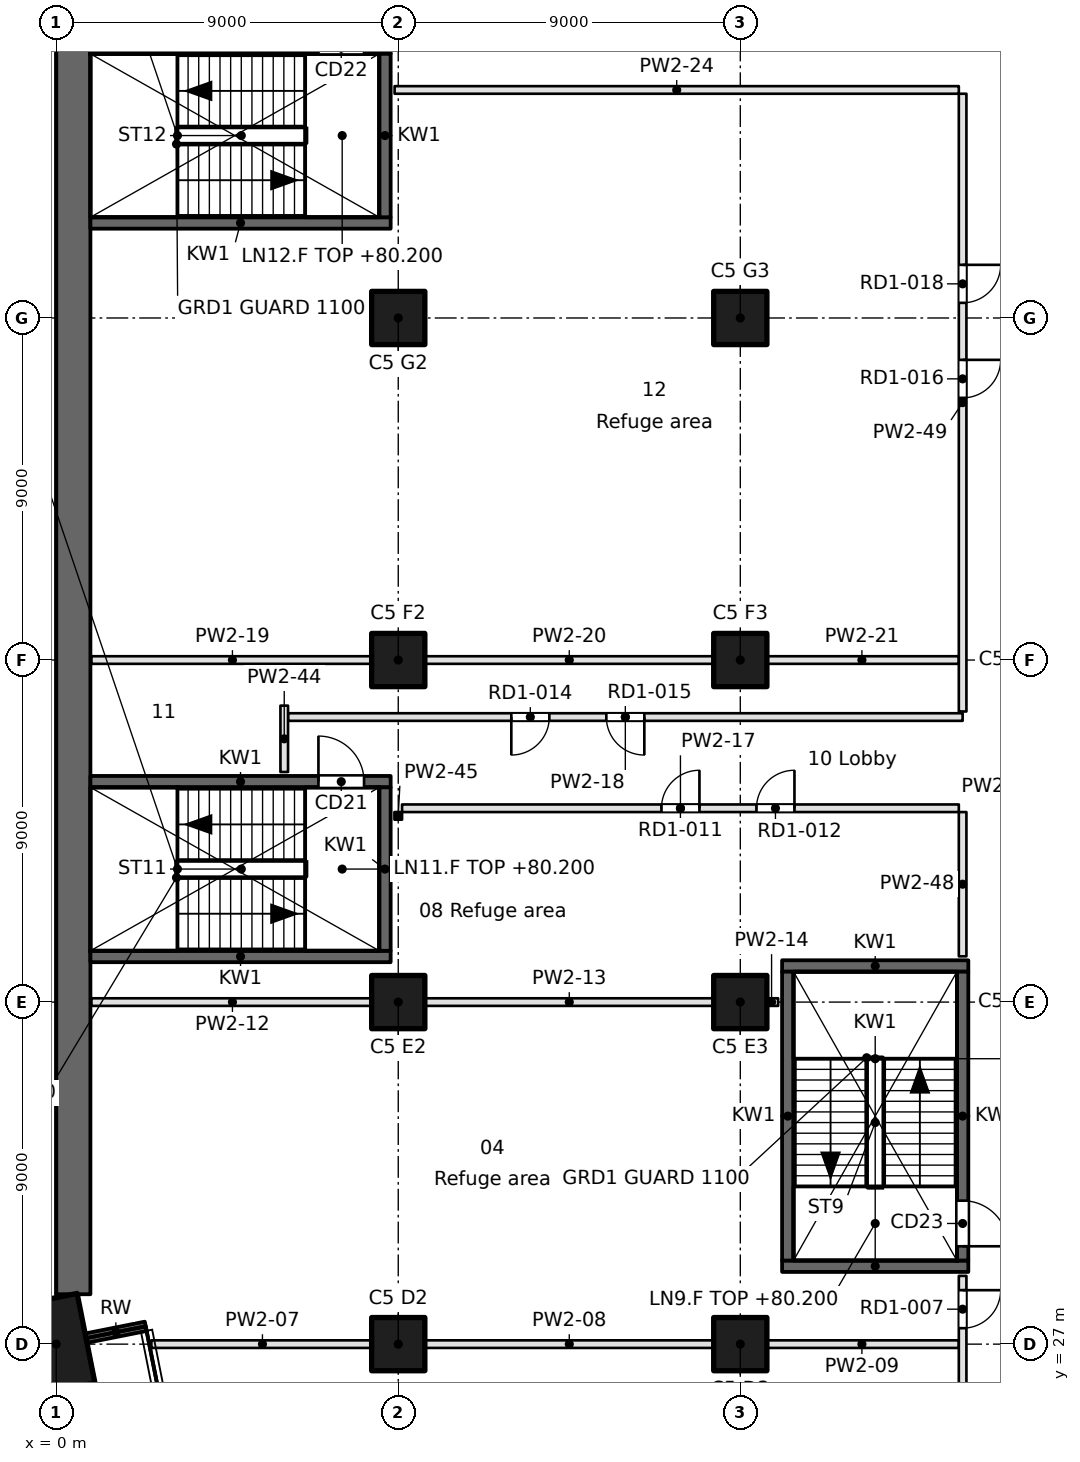
"""IFC4 building model, lengths in metres.
Left out: names, types, materials, properties, quantities, classifications, styles, units other than length and angle.
Written with IfcOpenShell. Run it as: python <this file> out.ifc"""

import sys

from ifc_helpers import new_model, si_unit, direction, frame, frame_2d, origin, origin_2d, place, context, subcontext, project, spatial, rectangle, extrude, element, fill, save


model = new_model("IFC4")
c1 = context("Model", 3, precision=1e-05, world=origin(), true_north=direction((0.0, 1.0)))
c2 = subcontext(c1, "Body", "Model", "MODEL_VIEW")
j1 = project(units=[si_unit("LENGTHUNIT", "METRE"), si_unit("PLANEANGLEUNIT", "RADIAN")], contexts=[c1])
p1 = place(None, origin())
s1 = spatial("IfcSite", under=j1, at=p1, CompositionType="ELEMENT")
p2 = place(p1, origin())
s2 = spatial("IfcBuilding", under=s1, at=p2, CompositionType="ELEMENT")
p3 = place(p2, frame((0.0, 0.0, 80.2)))
s3 = spatial("IfcBuildingStorey", under=s2, at=p3, CompositionType="ELEMENT", Elevation=80.2)
p4 = place(p3, frame((0.0, 27.0, 0.0), z_axis=(0.0, 0.0, 1.0), x_axis=(-0.195090322016, 0.980785280403, 0.0)))
e1 = element("IfcColumn", 1, at=p4, inside=s3, PredefinedType="COLUMN", context=c2, shape_type="SweptSolid", body=[
    extrude(rectangle(XDim=2.4, YDim=1.6, at=origin_2d()), origin(), (0.0, 0.0, 1.0), 4.6),
])
for number, where, z_axis, x_axis in (
    (2, (9.0, 27.0, 0.0), (0.0, 0.0, 1.0), (1.0, 0.0, 0.0)),
    (3, (9.0, 36.0, 0.0), (0.0, 0.0, 1.0), (1.0, 0.0, 0.0)),
    (4, (9.0, 45.0, 0.0), (0.0, 0.0, 1.0), (1.0, 0.0, 0.0)),
    (5, (9.0, 54.0, 0.0), (0.0, 0.0, 1.0), (1.0, 0.0, 0.0)),
    (6, (18.0, 27.0, 0.0), (0.0, 0.0, 1.0), (1.0, 0.0, 0.0)),
    (7, (18.0, 36.0, 0.0), (0.0, 0.0, 1.0), (1.0, 0.0, 0.0)),
    (8, (18.0, 45.0, 0.0), (0.0, 0.0, 1.0), (1.0, 0.0, 0.0)),
    (9, (18.0, 54.0, 0.0), (0.0, 0.0, 1.0), (1.0, 0.0, 0.0)),
):
    element("IfcColumn", number, at=place(p3, frame(where, z_axis=z_axis, x_axis=x_axis)), inside=s3, PredefinedType="COLUMN", context=c2, shape_type="SweptSolid", body=[
        extrude(rectangle(XDim=1.4, YDim=1.4, at=origin_2d()), origin(), (0.0, 0.0, 1.0), 4.6),
    ])
p5 = place(p3, frame((0.45, 94.5, 0.0), z_axis=(0.0, 0.0, 1.0), x_axis=(0.0, -1.0, 0.0)))
e10 = element("IfcWall", 10, at=p5, inside=s3, PredefinedType="SHEAR", context=c2, shape_type="SweptSolid", body=[
    extrude(rectangle(XDim=66.187, YDim=0.9, at=frame_2d((33.094, 0.0))), origin(), (0.0, 0.0, 1.0), 4.6),
])
p6 = place(p3, frame((0.784, 27.157, 0.0), z_axis=(0.0, 0.0, 1.0), x_axis=(0.980826234823, 0.19488431718, 0.0)))
e11 = element("IfcWall", 11, at=p6, inside=s3, PredefinedType="SOLIDWALL", context=c2, shape_type="SweptSolid", body=[
    extrude(rectangle(XDim=1.601, YDim=0.25, at=frame_2d((0.801, 0.0))), origin(), (0.0, 0.0, 1.0), 4.2),
])
for number, where, z_axis, x_axis in (
    (12, (19.1, 29.05, -0.45), (0.0, 0.0, 1.0), (1.0, 0.0, 0.0)),
    (13, (19.1, 36.95, -0.45), (0.0, 0.0, 1.0), (1.0, 0.0, 0.0)),
):
    element("IfcWall", number, at=place(p3, frame(where, z_axis=z_axis, x_axis=x_axis)), inside=s3, PredefinedType="SOLIDWALL", context=c2, shape_type="SweptSolid", body=[
        extrude(rectangle(XDim=4.9, YDim=0.3, at=frame_2d((2.45, 0.0))), origin(), (0.0, 0.0, 1.0), 4.65),
    ])
p7 = place(p3, frame((0.9, 37.2, -0.45), z_axis=(0.0, 0.0, 1.0), x_axis=(1.0, 0.0, 0.0)))
e14 = element("IfcWall", 14, at=p7, inside=s3, PredefinedType="SOLIDWALL", context=c2, shape_type="SweptSolid", body=[
    extrude(rectangle(XDim=7.9, YDim=0.3, at=frame_2d((3.95, 0.0))), origin(), (0.0, 0.0, 1.0), 4.65),
])
p8 = place(p3, frame((0.9, 41.8, -0.45), z_axis=(0.0, 0.0, 1.0), x_axis=(1.0, 0.0, 0.0)))
e15 = element("IfcWall", 15, at=p8, inside=s3, PredefinedType="SOLIDWALL", context=c2, shape_type="SweptSolid", body=[
    extrude(rectangle(XDim=7.9, YDim=0.3, at=frame_2d((3.95, 0.0))), origin(), (0.0, 0.0, 1.0), 4.65),
])
p9 = place(p8, frame((6.0, 0.0, 0.45)))
e16 = element("IfcOpeningElement", 16, at=p9, cuts=e15, PredefinedType="OPENING", context=c2, shape_type="SweptSolid", body=[
    extrude(rectangle(XDim=1.2, YDim=2.1, at=frame_2d((0.6, 1.05))), frame((0.0, 0.15, 0.0), z_axis=(0.0, -1.0, 0.0), x_axis=(1.0, 0.0, 0.0)), (0.0, 0.0, 1.0), 0.3),
])
p10 = place(p3, frame((0.9, 56.5, -0.45), z_axis=(0.0, 0.0, 1.0), x_axis=(1.0, 0.0, 0.0)))
e17 = element("IfcWall", 17, at=p10, inside=s3, PredefinedType="SOLIDWALL", context=c2, shape_type="SweptSolid", body=[
    extrude(rectangle(XDim=7.9, YDim=0.3, at=frame_2d((3.95, 0.0))), origin(), (0.0, 0.0, 1.0), 4.65),
])
p11 = place(p3, frame((0.9, 61.1, -0.45), z_axis=(0.0, 0.0, 1.0), x_axis=(1.0, 0.0, 0.0)))
e18 = element("IfcWall", 18, at=p11, inside=s3, PredefinedType="SOLIDWALL", context=c2, shape_type="SweptSolid", body=[
    extrude(rectangle(XDim=7.9, YDim=0.3, at=frame_2d((3.95, 0.0))), origin(), (0.0, 0.0, 1.0), 4.65),
])
p12 = place(p11, frame((6.0, 0.0, 0.45)))
e19 = element("IfcOpeningElement", 19, at=p12, cuts=e18, PredefinedType="OPENING", context=c2, shape_type="SweptSolid", body=[
    extrude(rectangle(XDim=1.2, YDim=2.1, at=frame_2d((0.6, 1.05))), frame((0.0, 0.15, 0.0), z_axis=(0.0, -1.0, 0.0), x_axis=(1.0, 0.0, 0.0)), (0.0, 0.0, 1.0), 0.3),
])
p13 = place(p3, frame((8.65, 37.35, -0.45), z_axis=(0.0, 0.0, 1.0), x_axis=(0.0, 1.0, 0.0)))
e20 = element("IfcWall", 20, at=p13, inside=s3, PredefinedType="SOLIDWALL", context=c2, shape_type="SweptSolid", body=[
    extrude(rectangle(XDim=4.3, YDim=0.3, at=frame_2d((2.15, 0.0))), origin(), (0.0, 0.0, 1.0), 4.65),
])
p14 = place(p3, frame((8.65, 56.65, -0.45), z_axis=(0.0, 0.0, 1.0), x_axis=(0.0, 1.0, 0.0)))
e21 = element("IfcWall", 21, at=p14, inside=s3, PredefinedType="SOLIDWALL", context=c2, shape_type="SweptSolid", body=[
    extrude(rectangle(XDim=4.3, YDim=0.3, at=frame_2d((2.15, 0.0))), origin(), (0.0, 0.0, 1.0), 4.65),
])
p15 = place(p3, frame((19.25, 29.2, -0.45), z_axis=(0.0, 0.0, 1.0), x_axis=(0.0, 1.0, 0.0)))
e22 = element("IfcWall", 22, at=p15, inside=s3, PredefinedType="SOLIDWALL", context=c2, shape_type="SweptSolid", body=[
    extrude(rectangle(XDim=7.6, YDim=0.3, at=frame_2d((3.8, 0.0))), origin(), (0.0, 0.0, 1.0), 4.65),
])
p16 = place(p3, frame((23.85, 29.2, -0.45), z_axis=(0.0, 0.0, 1.0), x_axis=(0.0, 1.0, 0.0)))
e23 = element("IfcWall", 23, at=p16, inside=s3, PredefinedType="SOLIDWALL", context=c2, shape_type="SweptSolid", body=[
    extrude(rectangle(XDim=7.6, YDim=0.3, at=frame_2d((3.8, 0.0))), origin(), (0.0, 0.0, 1.0), 4.65),
])
p17 = place(p16, frame((0.375, 0.0, 0.45)))
e24 = element("IfcOpeningElement", 24, at=p17, cuts=e23, PredefinedType="OPENING", context=c2, shape_type="SweptSolid", body=[
    extrude(rectangle(XDim=1.2, YDim=2.1, at=frame_2d((0.6, 1.05))), frame((0.0, 0.15, 0.0), z_axis=(0.0, -1.0, 0.0), x_axis=(1.0, 0.0, 0.0)), (0.0, 0.0, 1.0), 0.3),
])
p18 = place(p3, frame((2.503, 27.0, 0.0), z_axis=(0.0, 0.0, 1.0), x_axis=(1.0, 0.0, 0.0)))
e25 = element("IfcWall", 25, at=p18, inside=s3, PredefinedType="PARTITIONING", context=c2, shape_type="SweptSolid", body=[
    extrude(rectangle(XDim=5.847, YDim=0.2, at=frame_2d((2.924, 0.0))), origin(), (0.0, 0.0, 1.0), 4.2),
])
p19 = place(p3, frame((9.65, 27.0, 0.0), z_axis=(0.0, 0.0, 1.0), x_axis=(1.0, 0.0, 0.0)))
e26 = element("IfcWall", 26, at=p19, inside=s3, PredefinedType="PARTITIONING", context=c2, shape_type="SweptSolid", body=[
    extrude(rectangle(XDim=7.7, YDim=0.2, at=frame_2d((3.85, 0.0))), origin(), (0.0, 0.0, 1.0), 4.2),
])
p20 = place(p3, frame((18.65, 27.0, 0.0), z_axis=(0.0, 0.0, 1.0), x_axis=(1.0, 0.0, 0.0)))
e27 = element("IfcWall", 27, at=p20, inside=s3, PredefinedType="PARTITIONING", context=c2, shape_type="SweptSolid", body=[
    extrude(rectangle(XDim=5.1, YDim=0.2, at=frame_2d((2.55, 0.0))), origin(), (0.0, 0.0, 1.0), 4.2),
])
p21 = place(p3, frame((0.924, 36.0, 0.0), z_axis=(0.0, 0.0, 1.0), x_axis=(1.0, 0.0, 0.0)))
e28 = element("IfcWall", 28, at=p21, inside=s3, PredefinedType="PARTITIONING", context=c2, shape_type="SweptSolid", body=[
    extrude(rectangle(XDim=7.426, YDim=0.2, at=frame_2d((3.713, 0.0))), origin(), (0.0, 0.0, 1.0), 4.2),
])
p22 = place(p3, frame((9.65, 36.0, 0.0), z_axis=(0.0, 0.0, 1.0), x_axis=(1.0, 0.0, 0.0)))
e29 = element("IfcWall", 29, at=p22, inside=s3, PredefinedType="PARTITIONING", context=c2, shape_type="SweptSolid", body=[
    extrude(rectangle(XDim=7.7, YDim=0.2, at=frame_2d((3.85, 0.0))), origin(), (0.0, 0.0, 1.0), 4.2),
])
p23 = place(p3, frame((18.65, 36.0, 0.0), z_axis=(0.0, 0.0, 1.0), x_axis=(1.0, 0.0, 0.0)))
e30 = element("IfcWall", 30, at=p23, inside=s3, PredefinedType="PARTITIONING", context=c2, shape_type="SweptSolid", body=[
    extrude(rectangle(XDim=0.346, YDim=0.2, at=frame_2d((0.173, 0.0))), origin(), (0.0, 0.0, 1.0), 4.2),
])
p24 = place(p3, frame((23.75, 41.1, 0.0), z_axis=(0.0, 0.0, 1.0), x_axis=(-1.0, 0.0, 0.0)))
e31 = element("IfcWall", 31, at=p24, inside=s3, PredefinedType="PARTITIONING", context=c2, shape_type="SweptSolid", body=[
    extrude(rectangle(XDim=14.65, YDim=0.2, at=frame_2d((7.325, 0.0))), origin(), (0.0, 0.0, 1.0), 4.2),
])
p25 = place(p24, frame((6.825, 0.0, 0.0)))
e32 = element("IfcOpeningElement", 32, at=p25, cuts=e31, PredefinedType="OPENING", context=c2, shape_type="SweptSolid", body=[
    extrude(rectangle(XDim=1.0, YDim=2.1, at=frame_2d((0.5, 1.05))), frame((0.0, 0.1, 0.0), z_axis=(0.0, -1.0, 0.0), x_axis=(1.0, 0.0, 0.0)), (0.0, 0.0, 1.0), 0.2),
])
p26 = place(p24, frame((4.325, 0.0, 0.0)))
e33 = element("IfcOpeningElement", 33, at=p26, cuts=e31, PredefinedType="OPENING", context=c2, shape_type="SweptSolid", body=[
    extrude(rectangle(XDim=1.0, YDim=2.1, at=frame_2d((0.5, 1.05))), frame((0.0, 0.1, 0.0), z_axis=(0.0, -1.0, 0.0), x_axis=(1.0, 0.0, 0.0)), (0.0, 0.0, 1.0), 0.2),
])
p27 = place(p3, frame((6.1, 43.5, 0.0), z_axis=(0.0, 0.0, 1.0), x_axis=(1.0, 0.0, 0.0)))
e34 = element("IfcWall", 34, at=p27, inside=s3, PredefinedType="PARTITIONING", context=c2, shape_type="SweptSolid", body=[
    extrude(rectangle(XDim=17.75, YDim=0.2, at=frame_2d((8.875, 0.0))), origin(), (0.0, 0.0, 1.0), 4.2),
])
p28 = place(p27, frame((5.875, 0.0, 0.0)))
e35 = element("IfcOpeningElement", 35, at=p28, cuts=e34, PredefinedType="OPENING", context=c2, shape_type="SweptSolid", body=[
    extrude(rectangle(XDim=1.0, YDim=2.1, at=frame_2d((0.5, 1.05))), frame((0.0, 0.1, 0.0), z_axis=(0.0, -1.0, 0.0), x_axis=(1.0, 0.0, 0.0)), (0.0, 0.0, 1.0), 0.2),
])
p29 = place(p27, frame((8.375, 0.0, 0.0)))
e36 = element("IfcOpeningElement", 36, at=p29, cuts=e34, PredefinedType="OPENING", context=c2, shape_type="SweptSolid", body=[
    extrude(rectangle(XDim=1.0, YDim=2.1, at=frame_2d((0.5, 1.05))), frame((0.0, 0.1, 0.0), z_axis=(0.0, -1.0, 0.0), x_axis=(1.0, 0.0, 0.0)), (0.0, 0.0, 1.0), 0.2),
])
p30 = place(p3, frame((0.924, 45.0, 0.0), z_axis=(0.0, 0.0, 1.0), x_axis=(1.0, 0.0, 0.0)))
e37 = element("IfcWall", 37, at=p30, inside=s3, PredefinedType="PARTITIONING", context=c2, shape_type="SweptSolid", body=[
    extrude(rectangle(XDim=7.426, YDim=0.2, at=frame_2d((3.713, 0.0))), origin(), (0.0, 0.0, 1.0), 4.2),
])
p31 = place(p3, frame((9.65, 45.0, 0.0), z_axis=(0.0, 0.0, 1.0), x_axis=(1.0, 0.0, 0.0)))
e38 = element("IfcWall", 38, at=p31, inside=s3, PredefinedType="PARTITIONING", context=c2, shape_type="SweptSolid", body=[
    extrude(rectangle(XDim=7.7, YDim=0.2, at=frame_2d((3.85, 0.0))), origin(), (0.0, 0.0, 1.0), 4.2),
])
p32 = place(p3, frame((18.65, 45.0, 0.0), z_axis=(0.0, 0.0, 1.0), x_axis=(1.0, 0.0, 0.0)))
e39 = element("IfcWall", 39, at=p32, inside=s3, PredefinedType="PARTITIONING", context=c2, shape_type="SweptSolid", body=[
    extrude(rectangle(XDim=5.1, YDim=0.2, at=frame_2d((2.55, 0.0))), origin(), (0.0, 0.0, 1.0), 4.2),
])
p33 = place(p3, frame((23.75, 60.0, 0.0), z_axis=(0.0, 0.0, 1.0), x_axis=(-1.0, 0.0, 0.0)))
e40 = element("IfcWall", 40, at=p33, inside=s3, PredefinedType="PARTITIONING", context=c2, shape_type="SweptSolid", body=[
    extrude(rectangle(XDim=14.846, YDim=0.2, at=frame_2d((7.423, 0.0))), origin(), (0.0, 0.0, 1.0), 4.2),
])
p34 = place(p3, frame((6.0, 42.054, 0.0), z_axis=(0.0, 0.0, 1.0), x_axis=(0.0, 1.0, 0.0)))
e41 = element("IfcWall", 41, at=p34, inside=s3, PredefinedType="PARTITIONING", context=c2, shape_type="SweptSolid", body=[
    extrude(rectangle(XDim=1.746, YDim=0.2, at=frame_2d((0.873, 0.0))), origin(), (0.0, 0.0, 1.0), 4.2),
])
p35 = place(p3, frame((9.0, 41.0, 0.0), z_axis=(0.0, 0.0, 1.0), x_axis=(0.0, -1.0, 0.0)))
e42 = element("IfcWall", 42, at=p35, inside=s3, PredefinedType="PARTITIONING", context=c2, shape_type="SweptSolid", body=[
    extrude(rectangle(XDim=0.2, YDim=0.2, at=frame_2d((0.1, 0.0))), origin(), (0.0, 0.0, 1.0), 4.2),
])
p36 = place(p3, frame((23.85, 7.272, 0.0), z_axis=(0.0, 0.0, 1.0), x_axis=(0.0, 1.0, 0.0)))
e43 = element("IfcWall", 43, at=p36, inside=s3, PredefinedType="PARTITIONING", context=c2, shape_type="SweptSolid", body=[
    extrude(rectangle(XDim=21.524, YDim=0.2, at=frame_2d((10.762, 0.0))), origin(), (0.0, 0.0, 1.0), 4.2),
])
p37 = place(p36, frame((3.88, 0.0, 0.0)))
e44 = element("IfcOpeningElement", 44, at=p37, cuts=e43, PredefinedType="OPENING", context=c2, shape_type="SweptSolid", body=[
    extrude(rectangle(XDim=1.0, YDim=2.1, at=frame_2d((0.5, 1.05))), frame((0.0, 0.1, 0.0), z_axis=(0.0, -1.0, 0.0), x_axis=(1.0, 0.0, 0.0)), (0.0, 0.0, 1.0), 0.2),
])
p38 = place(p36, frame((6.38, 0.0, 0.0)))
e45 = element("IfcOpeningElement", 45, at=p38, cuts=e43, PredefinedType="OPENING", context=c2, shape_type="SweptSolid", body=[
    extrude(rectangle(XDim=1.0, YDim=2.1, at=frame_2d((0.5, 1.05))), frame((0.0, 0.1, 0.0), z_axis=(0.0, -1.0, 0.0), x_axis=(1.0, 0.0, 0.0)), (0.0, 0.0, 1.0), 0.2),
])
p39 = place(p36, frame((13.766, 0.0, 0.0)))
e46 = element("IfcOpeningElement", 46, at=p39, cuts=e43, PredefinedType="OPENING", context=c2, shape_type="SweptSolid", body=[
    extrude(rectangle(XDim=1.0, YDim=2.1, at=frame_2d((0.5, 1.05))), frame((0.0, 0.1, 0.0), z_axis=(0.0, -1.0, 0.0), x_axis=(1.0, 0.0, 0.0)), (0.0, 0.0, 1.0), 0.2),
])
p40 = place(p36, frame((16.266, 0.0, 0.0)))
e47 = element("IfcOpeningElement", 47, at=p40, cuts=e43, PredefinedType="OPENING", context=c2, shape_type="SweptSolid", body=[
    extrude(rectangle(XDim=1.0, YDim=2.1, at=frame_2d((0.5, 1.05))), frame((0.0, 0.1, 0.0), z_axis=(0.0, -1.0, 0.0), x_axis=(1.0, 0.0, 0.0)), (0.0, 0.0, 1.0), 0.2),
])
p41 = place(p36, frame((20.148, 0.0, 0.0)))
e48 = element("IfcOpeningElement", 48, at=p41, cuts=e43, PredefinedType="OPENING", context=c2, shape_type="SweptSolid", body=[
    extrude(rectangle(XDim=1.0, YDim=2.1, at=frame_2d((0.5, 1.05))), frame((0.0, 0.1, 0.0), z_axis=(0.0, -1.0, 0.0), x_axis=(1.0, 0.0, 0.0)), (0.0, 0.0, 1.0), 0.2),
])
p42 = place(p3, frame((23.85, 37.204, 0.0), z_axis=(0.0, 0.0, 1.0), x_axis=(0.0, 1.0, 0.0)))
e49 = element("IfcWall", 49, at=p42, inside=s3, PredefinedType="PARTITIONING", context=c2, shape_type="SweptSolid", body=[
    extrude(rectangle(XDim=3.796, YDim=0.2, at=frame_2d((1.898, 0.0))), origin(), (0.0, 0.0, 1.0), 4.2),
])
p43 = place(p3, frame((23.85, 43.646, 0.0), z_axis=(0.0, 0.0, 1.0), x_axis=(0.0, 1.0, 0.0)))
e50 = element("IfcWall", 50, at=p43, inside=s3, PredefinedType="PARTITIONING", context=c2, shape_type="SweptSolid", body=[
    extrude(rectangle(XDim=16.254, YDim=0.2, at=frame_2d((8.127, 0.0))), origin(), (0.0, 0.0, 1.0), 4.2),
])
p44 = place(p43, frame((8.252, 0.0, 0.0)))
e51 = element("IfcOpeningElement", 51, at=p44, cuts=e50, PredefinedType="OPENING", context=c2, shape_type="SweptSolid", body=[
    extrude(rectangle(XDim=1.0, YDim=2.1, at=frame_2d((0.5, 1.05))), frame((0.0, 0.1, 0.0), z_axis=(0.0, -1.0, 0.0), x_axis=(1.0, 0.0, 0.0)), (0.0, 0.0, 1.0), 0.2),
])
p45 = place(p43, frame((10.752, 0.0, 0.0)))
e52 = element("IfcOpeningElement", 52, at=p45, cuts=e50, PredefinedType="OPENING", context=c2, shape_type="SweptSolid", body=[
    extrude(rectangle(XDim=1.0, YDim=2.1, at=frame_2d((0.5, 1.05))), frame((0.0, 0.1, 0.0), z_axis=(0.0, -1.0, 0.0), x_axis=(1.0, 0.0, 0.0)), (0.0, 0.0, 1.0), 0.2),
])
p46 = place(p9, origin())
e53 = element("IfcDoor", 53, at=p46, inside=s3, OperationType="SINGLE_SWING_LEFT", PredefinedType="DOOR", context=c2, shape_type="SweptSolid", body=[
    extrude(rectangle(XDim=1.2, YDim=2.1, at=frame_2d((0.6, 1.05))), frame((0.0, 0.025, 0.0), z_axis=(0.0, -1.0, 0.0), x_axis=(1.0, 0.0, 0.0)), (0.0, 0.0, 1.0), 0.05),
])
fill(e16, e53)
p47 = place(p17, frame((1.2, 0.0, 0.0), z_axis=(0.0, 0.0, 1.0), x_axis=(-1.0, 0.0, 0.0)))
e54 = element("IfcDoor", 54, at=p47, inside=s3, OperationType="SINGLE_SWING_RIGHT", PredefinedType="DOOR", context=c2, shape_type="SweptSolid", body=[
    extrude(rectangle(XDim=1.2, YDim=2.1, at=frame_2d((0.6, 1.05))), frame((0.0, 0.025, 0.0), z_axis=(0.0, -1.0, 0.0), x_axis=(1.0, 0.0, 0.0)), (0.0, 0.0, 1.0), 0.05),
])
fill(e24, e54)
p48 = place(p41, frame((1.0, 0.0, 0.0), z_axis=(0.0, 0.0, 1.0), x_axis=(-1.0, 0.0, 0.0)))
e55 = element("IfcDoor", 55, at=p48, inside=s3, OperationType="SINGLE_SWING_LEFT", PredefinedType="DOOR", context=c2, shape_type="SweptSolid", body=[
    extrude(rectangle(XDim=1.0, YDim=2.1, at=frame_2d((0.5, 1.05))), frame((0.0, 0.025, 0.0), z_axis=(0.0, -1.0, 0.0), x_axis=(1.0, 0.0, 0.0)), (0.0, 0.0, 1.0), 0.05),
])
fill(e48, e55)
p49 = place(p25, frame((1.0, 0.0, 0.0), z_axis=(0.0, 0.0, 1.0), x_axis=(-1.0, 0.0, 0.0)))
e56 = element("IfcDoor", 56, at=p49, inside=s3, OperationType="SINGLE_SWING_RIGHT", PredefinedType="DOOR", context=c2, shape_type="SweptSolid", body=[
    extrude(rectangle(XDim=1.0, YDim=2.1, at=frame_2d((0.5, 1.05))), frame((0.0, 0.025, 0.0), z_axis=(0.0, -1.0, 0.0), x_axis=(1.0, 0.0, 0.0)), (0.0, 0.0, 1.0), 0.05),
])
fill(e32, e56)
p50 = place(p26, frame((1.0, 0.0, 0.0), z_axis=(0.0, 0.0, 1.0), x_axis=(-1.0, 0.0, 0.0)))
e57 = element("IfcDoor", 57, at=p50, inside=s3, OperationType="SINGLE_SWING_RIGHT", PredefinedType="DOOR", context=c2, shape_type="SweptSolid", body=[
    extrude(rectangle(XDim=1.0, YDim=2.1, at=frame_2d((0.5, 1.05))), frame((0.0, 0.025, 0.0), z_axis=(0.0, -1.0, 0.0), x_axis=(1.0, 0.0, 0.0)), (0.0, 0.0, 1.0), 0.05),
])
fill(e33, e57)
p51 = place(p28, frame((1.0, 0.0, 0.0), z_axis=(0.0, 0.0, 1.0), x_axis=(-1.0, 0.0, 0.0)))
e58 = element("IfcDoor", 58, at=p51, inside=s3, OperationType="SINGLE_SWING_RIGHT", PredefinedType="DOOR", context=c2, shape_type="SweptSolid", body=[
    extrude(rectangle(XDim=1.0, YDim=2.1, at=frame_2d((0.5, 1.05))), frame((0.0, 0.025, 0.0), z_axis=(0.0, -1.0, 0.0), x_axis=(1.0, 0.0, 0.0)), (0.0, 0.0, 1.0), 0.05),
])
fill(e35, e58)
p52 = place(p29, frame((1.0, 0.0, 0.0), z_axis=(0.0, 0.0, 1.0), x_axis=(-1.0, 0.0, 0.0)))
e59 = element("IfcDoor", 59, at=p52, inside=s3, OperationType="SINGLE_SWING_LEFT", PredefinedType="DOOR", context=c2, shape_type="SweptSolid", body=[
    extrude(rectangle(XDim=1.0, YDim=2.1, at=frame_2d((0.5, 1.05))), frame((0.0, 0.025, 0.0), z_axis=(0.0, -1.0, 0.0), x_axis=(1.0, 0.0, 0.0)), (0.0, 0.0, 1.0), 0.05),
])
fill(e36, e59)
p53 = place(p44, frame((1.0, 0.0, 0.0), z_axis=(0.0, 0.0, 1.0), x_axis=(-1.0, 0.0, 0.0)))
e60 = element("IfcDoor", 60, at=p53, inside=s3, OperationType="SINGLE_SWING_LEFT", PredefinedType="DOOR", context=c2, shape_type="SweptSolid", body=[
    extrude(rectangle(XDim=1.0, YDim=2.1, at=frame_2d((0.5, 1.05))), frame((0.0, 0.025, 0.0), z_axis=(0.0, -1.0, 0.0), x_axis=(1.0, 0.0, 0.0)), (0.0, 0.0, 1.0), 0.05),
])
fill(e51, e60)
p54 = place(p45, frame((1.0, 0.0, 0.0), z_axis=(0.0, 0.0, 1.0), x_axis=(-1.0, 0.0, 0.0)))
e61 = element("IfcDoor", 61, at=p54, inside=s3, OperationType="SINGLE_SWING_LEFT", PredefinedType="DOOR", context=c2, shape_type="SweptSolid", body=[
    extrude(rectangle(XDim=1.0, YDim=2.1, at=frame_2d((0.5, 1.05))), frame((0.0, 0.025, 0.0), z_axis=(0.0, -1.0, 0.0), x_axis=(1.0, 0.0, 0.0)), (0.0, 0.0, 1.0), 0.05),
])
fill(e52, e61)
save(model, sys.argv[1])
